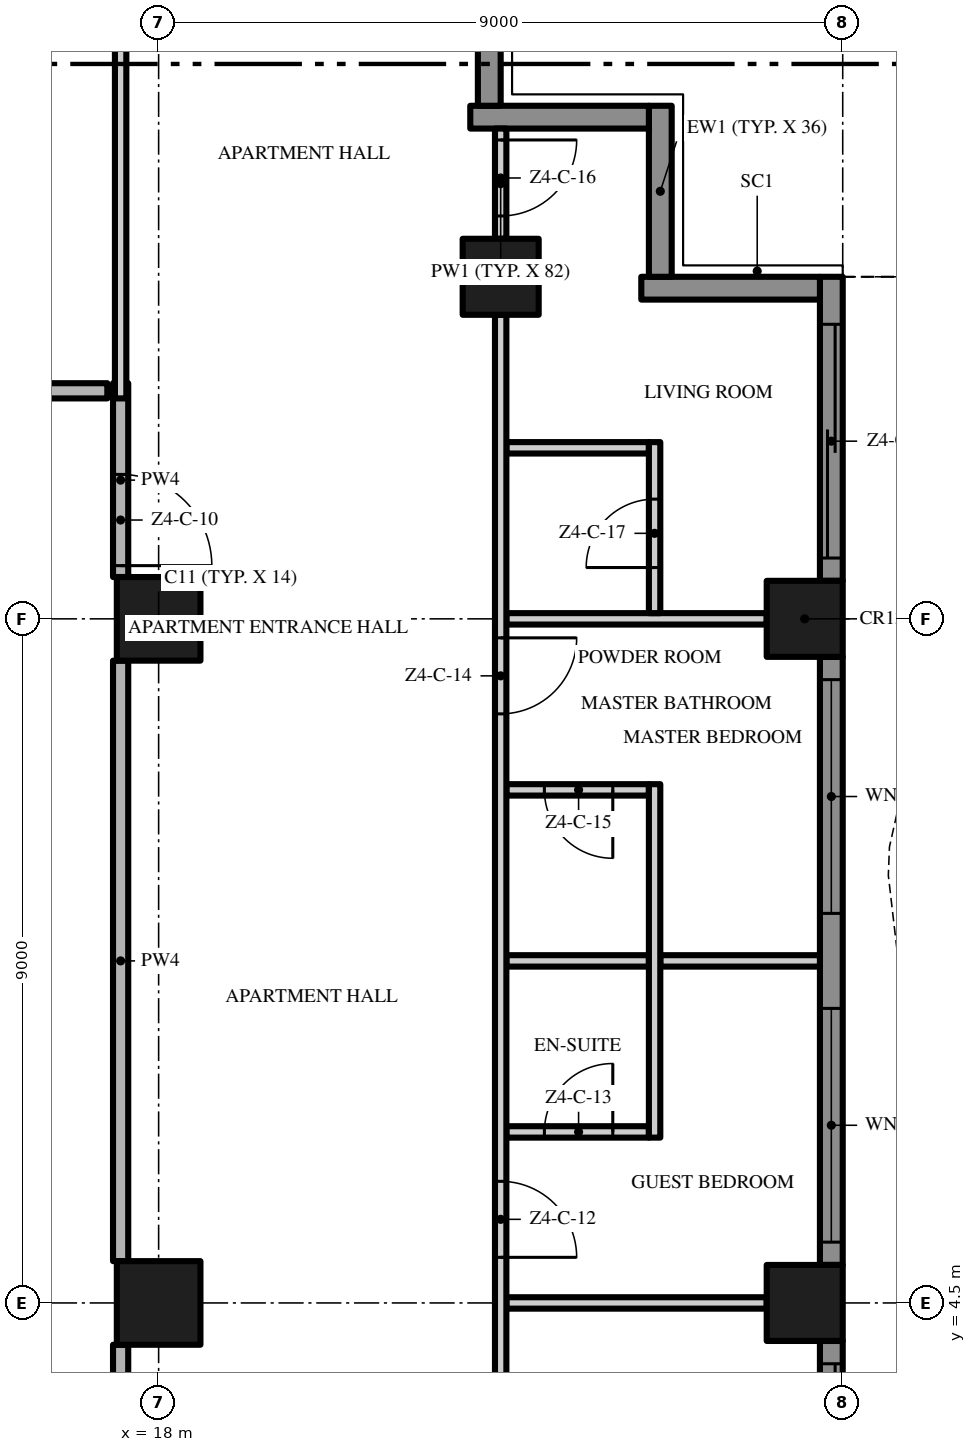
"""IFC4 building model, lengths in metres.
Left out: names, types, materials, properties, quantities, classifications, styles, units other than length and angle.
Written with IfcOpenShell. Run it as: python <this file> out.ifc"""

import sys

from ifc_helpers import new_model, si_unit, direction, frame, frame_2d, origin, origin_2d, place, context, subcontext, project, spatial, polyline, rectangle, outline, extrude, element, fill, save


model = new_model("IFC4")
c1 = context("Model", 3, precision=1e-05, world=origin(), true_north=direction((0.0, 1.0)))
c2 = subcontext(c1, "Body", "Model", "MODEL_VIEW")
j1 = project(units=[si_unit("LENGTHUNIT", "METRE"), si_unit("PLANEANGLEUNIT", "RADIAN")], contexts=[c1])
p1 = place(None, origin())
s1 = spatial("IfcSite", under=j1, at=p1, CompositionType="ELEMENT")
p2 = place(p1, origin())
s2 = spatial("IfcBuilding", under=s1, at=p2, CompositionType="ELEMENT")
p3 = place(p2, frame((0.0, 0.0, 207.2)))
s3 = spatial("IfcBuildingStorey", under=s2, at=p3, CompositionType="ELEMENT", Elevation=207.2)
for number, where, z_axis, x_axis in (
    (1, (18.0, 13.5, 0.0), (0.0, 0.0, 1.0), (1.0, 0.0, 0.0)),
    (2, (18.0, 4.5, 0.0), (0.0, 0.0, 1.0), (1.0, 0.0, 0.0)),
):
    element("IfcColumn", number, at=place(p3, frame(where, z_axis=z_axis, x_axis=x_axis)), inside=s3, PredefinedType="COLUMN", context=c2, shape_type="SweptSolid", body=[
        extrude(rectangle(XDim=1.1, YDim=1.1, at=origin_2d()), origin(), (0.0, 0.0, 1.0), 3.5),
    ])
for number, where, z_axis, x_axis in (
    (3, (26.5, 13.5, 0.0), (0.0, 0.0, 1.0), (1.0, 0.0, 0.0)),
    (4, (22.5, 18.0, 0.0), (0.0, 0.0, 1.0), (1.0, 0.0, 0.0)),
    (5, (26.5, 4.5, 0.0), (0.0, 0.0, 1.0), (1.0, 0.0, 0.0)),
):
    element("IfcColumn", number, at=place(p3, frame(where, z_axis=z_axis, x_axis=x_axis)), inside=s3, PredefinedType="COLUMN", context=c2, shape_type="SweptSolid", body=[
        extrude(rectangle(XDim=1.0, YDim=1.0, at=origin_2d()), origin(), (0.0, 0.0, 1.0), 3.5),
    ])
p4 = place(p3, frame((26.85, 4.0, 0.0), z_axis=(0.0, 0.0, 1.0), x_axis=(0.0, -1.0, 0.0)))
e6 = element("IfcWall", 6, at=p4, inside=s3, PredefinedType="SOLIDWALL", context=c2, shape_type="SweptSolid", body=[
    extrude(rectangle(XDim=8.0, YDim=0.3, at=frame_2d((4.0, 0.0))), origin(), (0.0, 0.0, 1.0), 3.5),
])
p5 = place(p4, frame((4.625, 0.0, 0.45)))
e7 = element("IfcOpeningElement", 7, at=p5, cuts=e6, PredefinedType="OPENING", context=c2, shape_type="SweptSolid", body=[
    extrude(rectangle(XDim=3.075, YDim=2.65, at=frame_2d((1.538, 1.325))), frame((0.0, 0.16, 0.0), z_axis=(0.0, -1.0, 0.0), x_axis=(1.0, 0.0, 0.0)), (0.0, 0.0, 1.0), 0.32),
])
p6 = place(p4, frame((0.3, 0.0, 0.0)))
e8 = element("IfcOpeningElement", 8, at=p6, cuts=e6, PredefinedType="OPENING", context=c2, shape_type="SweptSolid", body=[
    extrude(rectangle(XDim=3.075, YDim=2.4, at=frame_2d((1.538, 1.2))), frame((0.0, 0.16, 0.0), z_axis=(0.0, -1.0, 0.0), x_axis=(1.0, 0.0, 0.0)), (0.0, 0.0, 1.0), 0.32),
])
p7 = place(p3, frame((26.85, 13.0, 0.0), z_axis=(0.0, 0.0, 1.0), x_axis=(0.0, -1.0, 0.0)))
e9 = element("IfcWall", 9, at=p7, inside=s3, PredefinedType="SOLIDWALL", context=c2, shape_type="SweptSolid", body=[
    extrude(rectangle(XDim=8.0, YDim=0.3, at=frame_2d((4.0, 0.0))), origin(), (0.0, 0.0, 1.0), 3.5),
])
p8 = place(p7, frame((4.625, 0.0, 0.45)))
e10 = element("IfcOpeningElement", 10, at=p8, cuts=e9, PredefinedType="OPENING", context=c2, shape_type="SweptSolid", body=[
    extrude(rectangle(XDim=3.075, YDim=2.65, at=frame_2d((1.538, 1.325))), frame((0.0, 0.16, 0.0), z_axis=(0.0, -1.0, 0.0), x_axis=(1.0, 0.0, 0.0)), (0.0, 0.0, 1.0), 0.32),
])
p9 = place(p7, frame((0.3, 0.0, 0.45)))
e11 = element("IfcOpeningElement", 11, at=p9, cuts=e9, PredefinedType="OPENING", context=c2, shape_type="SweptSolid", body=[
    extrude(rectangle(XDim=3.075, YDim=2.65, at=frame_2d((1.538, 1.325))), frame((0.0, 0.16, 0.0), z_axis=(0.0, -1.0, 0.0), x_axis=(1.0, 0.0, 0.0)), (0.0, 0.0, 1.0), 0.32),
])
p10 = place(p3, frame((26.85, 18.0, 0.0), z_axis=(0.0, 0.0, 1.0), x_axis=(0.0, -1.0, 0.0)))
e12 = element("IfcWall", 12, at=p10, inside=s3, PredefinedType="SOLIDWALL", context=c2, shape_type="SweptSolid", body=[
    extrude(rectangle(XDim=4.0, YDim=0.3, at=frame_2d((2.0, 0.0))), origin(), (0.0, 0.0, 1.0), 3.5),
])
p11 = place(p10, frame((0.625, 0.0, 0.0)))
e13 = element("IfcOpeningElement", 13, at=p11, cuts=e12, PredefinedType="OPENING", context=c2, shape_type="SweptSolid", body=[
    extrude(rectangle(XDim=3.075, YDim=2.4, at=frame_2d((1.538, 1.2))), frame((0.0, 0.16, 0.0), z_axis=(0.0, -1.0, 0.0), x_axis=(1.0, 0.0, 0.0)), (0.0, 0.0, 1.0), 0.32),
])
p12 = place(p3, frame((24.35, 17.85, 0.0), z_axis=(0.0, 0.0, 1.0), x_axis=(1.0, 0.0, 0.0)))
e14 = element("IfcWall", 14, at=p12, inside=s3, PredefinedType="SOLIDWALL", context=c2, shape_type="SweptSolid", body=[
    extrude(rectangle(XDim=2.35, YDim=0.3, at=frame_2d((1.175, 0.0))), origin(), (0.0, 0.0, 1.0), 3.5),
])
p13 = place(p3, frame((24.6, 20.25, 0.0), z_axis=(0.0, 0.0, 1.0), x_axis=(0.0, -1.0, 0.0)))
e15 = element("IfcWall", 15, at=p13, inside=s3, PredefinedType="SOLIDWALL", context=c2, shape_type="SweptSolid", body=[
    extrude(rectangle(XDim=2.25, YDim=0.3, at=frame_2d((1.125, 0.0))), origin(), (0.0, 0.0, 1.0), 3.5),
])
p14 = place(p3, frame((22.1, 20.1, 0.0), z_axis=(0.0, 0.0, 1.0), x_axis=(1.0, 0.0, 0.0)))
e16 = element("IfcWall", 16, at=p14, inside=s3, PredefinedType="SOLIDWALL", context=c2, shape_type="SweptSolid", body=[
    extrude(rectangle(XDim=2.35, YDim=0.3, at=frame_2d((1.175, 0.0))), origin(), (0.0, 0.0, 1.0), 3.5),
])
p15 = place(p3, frame((22.35, 22.5, 0.0), z_axis=(0.0, 0.0, 1.0), x_axis=(0.0, -1.0, 0.0)))
e17 = element("IfcWall", 17, at=p15, inside=s3, PredefinedType="SOLIDWALL", context=c2, shape_type="SweptSolid", body=[
    extrude(rectangle(XDim=2.25, YDim=0.3, at=frame_2d((1.125, 0.0))), origin(), (0.0, 0.0, 1.0), 3.5),
])
p16 = place(p3, origin())
e18 = element("IfcWall", 18, at=p16, inside=s3, PredefinedType="USERDEFINED", context=c2, shape_type="SweptSolid", body=[
    extrude(outline(polyline([(27.951, -18.0), (28.612, -16.5), (29.345, -15.0), (29.869, -13.5), (30.0, -12.375), (29.985, -12.0), (29.649, -10.5), (28.988, -9.0), (28.255, -7.5), (27.731, -6.0), (27.6, -4.875), (27.615, -4.5), (27.951, -3.0), (28.612, -1.5), (29.345, 0.0), (29.869, 1.5), (30.0, 2.625), (29.985, 3.0), (29.649, 4.5), (28.988, 6.0), (28.255, 7.5), (27.731, 9.0), (27.6, 10.125), (27.615, 10.5), (27.951, 12.0), (28.612, 13.5), (29.345, 15.0), (29.869, 16.5), (30.0, 17.625), (29.985, 18.0), (29.735, 17.99), (29.749, 17.635), (29.624, 16.556), (29.114, 15.096), (28.385, 13.605), (27.713, 12.079), (27.366, 10.533), (27.349, 10.115), (27.486, 8.944), (28.024, 7.404), (28.761, 5.895), (29.41, 4.421), (29.736, 2.967), (29.749, 2.635), (29.624, 1.556), (29.114, 0.096), (28.385, -1.395), (27.713, -2.921), (27.366, -4.467), (27.349, -4.885), (27.486, -6.056), (28.024, -7.596), (28.761, -9.105), (29.41, -10.579), (29.736, -12.033), (29.749, -12.365), (29.624, -13.444), (29.114, -14.904), (28.385, -16.395), (27.723, -17.899), (27.951, -18.0)])), origin(), (0.0, 0.0, 1.0), 0.9),
])
p17 = place(p3, frame((22.575, 4.5, 0.0), z_axis=(0.0, 0.0, 1.0), x_axis=(1.0, 0.0, 0.0)))
e19 = element("IfcWall", 19, at=p17, inside=s3, PredefinedType="PARTITIONING", context=c2, shape_type="SweptSolid", body=[
    extrude(rectangle(XDim=3.425, YDim=0.15, at=frame_2d((1.712, 0.0))), origin(), (0.0, 0.0, 1.0), 3.5),
])
p18 = place(p3, frame((22.575, 6.75, 0.0), z_axis=(0.0, 0.0, 1.0), x_axis=(1.0, 0.0, 0.0)))
e20 = element("IfcWall", 20, at=p18, inside=s3, PredefinedType="PARTITIONING", context=c2, shape_type="SweptSolid", body=[
    extrude(rectangle(XDim=1.875, YDim=0.15, at=frame_2d((0.938, 0.0))), origin(), (0.0, 0.0, 1.0), 3.5),
])
p19 = place(p18, frame((0.5, 0.0, 0.0)))
e21 = element("IfcOpeningElement", 21, at=p19, cuts=e20, PredefinedType="OPENING", context=c2, shape_type="SweptSolid", body=[
    extrude(rectangle(XDim=0.9, YDim=2.1, at=frame_2d((0.45, 1.05))), frame((0.0, 0.085, 0.0), z_axis=(0.0, -1.0, 0.0), x_axis=(1.0, 0.0, 0.0)), (0.0, 0.0, 1.0), 0.17),
])
p20 = place(p3, frame((22.575, 9.0, 0.0), z_axis=(0.0, 0.0, 1.0), x_axis=(1.0, 0.0, 0.0)))
e22 = element("IfcWall", 22, at=p20, inside=s3, PredefinedType="PARTITIONING", context=c2, shape_type="SweptSolid", body=[
    extrude(rectangle(XDim=1.875, YDim=0.15, at=frame_2d((0.938, 0.0))), origin(), (0.0, 0.0, 1.0), 3.5),
])
p21 = place(p3, frame((24.6, 9.0, 0.0), z_axis=(0.0, 0.0, 1.0), x_axis=(1.0, 0.0, 0.0)))
e23 = element("IfcWall", 23, at=p21, inside=s3, PredefinedType="PARTITIONING", context=c2, shape_type="SweptSolid", body=[
    extrude(rectangle(XDim=2.1, YDim=0.15, at=frame_2d((1.05, 0.0))), origin(), (0.0, 0.0, 1.0), 3.5),
])
p22 = place(p3, frame((24.45, 11.25, 0.0), z_axis=(0.0, 0.0, 1.0), x_axis=(-1.0, 0.0, 0.0)))
e24 = element("IfcWall", 24, at=p22, inside=s3, PredefinedType="PARTITIONING", context=c2, shape_type="SweptSolid", body=[
    extrude(rectangle(XDim=1.875, YDim=0.15, at=frame_2d((0.938, 0.0))), origin(), (0.0, 0.0, 1.0), 3.5),
])
p23 = place(p22, frame((0.475, 0.0, 0.0)))
e25 = element("IfcOpeningElement", 25, at=p23, cuts=e24, PredefinedType="OPENING", context=c2, shape_type="SweptSolid", body=[
    extrude(rectangle(XDim=0.9, YDim=2.1, at=frame_2d((0.45, 1.05))), frame((0.0, 0.085, 0.0), z_axis=(0.0, -1.0, 0.0), x_axis=(1.0, 0.0, 0.0)), (0.0, 0.0, 1.0), 0.17),
])
p24 = place(p3, frame((22.575, 13.5, 0.0), z_axis=(0.0, 0.0, 1.0), x_axis=(1.0, 0.0, 0.0)))
e26 = element("IfcWall", 26, at=p24, inside=s3, PredefinedType="PARTITIONING", context=c2, shape_type="SweptSolid", body=[
    extrude(rectangle(XDim=3.425, YDim=0.15, at=frame_2d((1.712, 0.0))), origin(), (0.0, 0.0, 1.0), 3.5),
])
p25 = place(p3, frame((22.575, 15.75, 0.0), z_axis=(0.0, 0.0, 1.0), x_axis=(1.0, 0.0, 0.0)))
e27 = element("IfcWall", 27, at=p25, inside=s3, PredefinedType="PARTITIONING", context=c2, shape_type="SweptSolid", body=[
    extrude(rectangle(XDim=1.875, YDim=0.15, at=frame_2d((0.938, 0.0))), origin(), (0.0, 0.0, 1.0), 3.5),
])
p26 = place(p3, frame((13.5, 16.5, 0.0), z_axis=(0.0, 0.0, 1.0), x_axis=(1.0, 0.0, 0.0)))
e28 = element("IfcWall", 28, at=p26, inside=s3, PredefinedType="PARTITIONING", context=c2, shape_type="SweptSolid", body=[
    extrude(rectangle(XDim=3.825, YDim=0.2, at=frame_2d((1.913, 0.0))), origin(), (0.0, 0.0, 1.0), 3.5),
])
p27 = place(p26, frame((1.55, 0.0, 0.0)))
e29 = element("IfcOpeningElement", 29, at=p27, cuts=e28, PredefinedType="OPENING", context=c2, shape_type="SweptSolid", body=[
    extrude(rectangle(XDim=0.9, YDim=2.1, at=frame_2d((0.45, 1.05))), frame((0.0, 0.11, 0.0), z_axis=(0.0, -1.0, 0.0), x_axis=(1.0, 0.0, 0.0)), (0.0, 0.0, 1.0), 0.22),
])
p28 = place(p3, frame((17.5, -0.2, 0.0), z_axis=(0.0, 0.0, 1.0), x_axis=(0.0, 1.0, 0.0)))
e30 = element("IfcWall", 30, at=p28, inside=s3, PredefinedType="PARTITIONING", context=c2, shape_type="SweptSolid", body=[
    extrude(rectangle(XDim=4.15, YDim=0.2, at=frame_2d((2.075, 0.0))), origin(), (0.0, 0.0, 1.0), 3.5),
])
p29 = place(p3, frame((17.5, 5.05, 0.0), z_axis=(0.0, 0.0, 1.0), x_axis=(0.0, 1.0, 0.0)))
e31 = element("IfcWall", 31, at=p29, inside=s3, PredefinedType="PARTITIONING", context=c2, shape_type="SweptSolid", body=[
    extrude(rectangle(XDim=7.9, YDim=0.2, at=frame_2d((3.95, 0.0))), origin(), (0.0, 0.0, 1.0), 3.5),
])
p30 = place(p3, frame((17.5, 16.6, 0.0), z_axis=(0.0, 0.0, 1.0), x_axis=(0.0, -1.0, 0.0)))
e32 = element("IfcWall", 32, at=p30, inside=s3, PredefinedType="PARTITIONING", context=c2, shape_type="SweptSolid", body=[
    extrude(rectangle(XDim=2.55, YDim=0.2, at=frame_2d((1.275, 0.0))), origin(), (0.0, 0.0, 1.0), 3.5),
])
p31 = place(p30, frame((1.2, 0.0, 0.0)))
e33 = element("IfcOpeningElement", 33, at=p31, cuts=e32, PredefinedType="OPENING", context=c2, shape_type="SweptSolid", body=[
    extrude(rectangle(XDim=1.2, YDim=2.4, at=frame_2d((0.6, 1.2))), frame((0.0, 0.11, 0.0), z_axis=(0.0, -1.0, 0.0), x_axis=(1.0, 0.0, 0.0)), (0.0, 0.0, 1.0), 0.22),
])
p32 = place(p3, frame((17.5, 16.4, 0.0), z_axis=(0.0, 0.0, 1.0), x_axis=(0.0, 1.0, 0.0)))
e34 = element("IfcWall", 34, at=p32, inside=s3, PredefinedType="PARTITIONING", context=c2, shape_type="SweptSolid", body=[
    extrude(rectangle(XDim=5.1, YDim=0.15, at=frame_2d((2.55, 0.0))), origin(), (0.0, 0.0, 1.0), 3.5),
])
p33 = place(p3, frame((22.5, 17.5, 0.0), z_axis=(0.0, 0.0, 1.0), x_axis=(0.0, -1.0, 0.0)))
e35 = element("IfcWall", 35, at=p33, inside=s3, PredefinedType="PARTITIONING", context=c2, shape_type="SweptSolid", body=[
    extrude(rectangle(XDim=17.4, YDim=0.15, at=frame_2d((8.7, 0.0))), origin(), (0.0, 0.0, 1.0), 3.5),
])
p34 = place(p33, frame((14.75, 0.0, 0.0)))
e36 = element("IfcOpeningElement", 36, at=p34, cuts=e35, PredefinedType="OPENING", context=c2, shape_type="SweptSolid", body=[
    extrude(rectangle(XDim=1.0, YDim=2.4, at=frame_2d((0.5, 1.2))), frame((0.0, 0.085, 0.0), z_axis=(0.0, -1.0, 0.0), x_axis=(1.0, 0.0, 0.0)), (0.0, 0.0, 1.0), 0.17),
])
p35 = place(p33, frame((11.4, 0.0, 0.0)))
e37 = element("IfcOpeningElement", 37, at=p35, cuts=e35, PredefinedType="OPENING", context=c2, shape_type="SweptSolid", body=[
    extrude(rectangle(XDim=1.0, YDim=2.4, at=frame_2d((0.5, 1.2))), frame((0.0, 0.085, 0.0), z_axis=(0.0, -1.0, 0.0), x_axis=(1.0, 0.0, 0.0)), (0.0, 0.0, 1.0), 0.17),
])
p36 = place(p33, frame((4.25, 0.0, 0.0)))
e38 = element("IfcOpeningElement", 38, at=p36, cuts=e35, PredefinedType="OPENING", context=c2, shape_type="SweptSolid", body=[
    extrude(rectangle(XDim=1.0, YDim=2.4, at=frame_2d((0.5, 1.2))), frame((0.0, 0.085, 0.0), z_axis=(0.0, -1.0, 0.0), x_axis=(1.0, 0.0, 0.0)), (0.0, 0.0, 1.0), 0.17),
])
p37 = place(p3, frame((22.5, 19.95, 0.0), z_axis=(0.0, 0.0, 1.0), x_axis=(0.0, -1.0, 0.0)))
e39 = element("IfcWall", 39, at=p37, inside=s3, PredefinedType="PARTITIONING", context=c2, shape_type="SweptSolid", body=[
    extrude(rectangle(XDim=1.45, YDim=0.15, at=frame_2d((0.725, 0.0))), origin(), (0.0, 0.0, 1.0), 3.5),
])
p38 = place(p37, frame((0.15, 0.0, 0.0)))
e40 = element("IfcOpeningElement", 40, at=p38, cuts=e39, PredefinedType="OPENING", context=c2, shape_type="SweptSolid", body=[
    extrude(rectangle(XDim=1.0, YDim=2.4, at=frame_2d((0.5, 1.2))), frame((0.0, 0.085, 0.0), z_axis=(0.0, -1.0, 0.0), x_axis=(1.0, 0.0, 0.0)), (0.0, 0.0, 1.0), 0.17),
])
p39 = place(p3, frame((24.525, 6.675, 0.0), z_axis=(0.0, 0.0, 1.0), x_axis=(0.0, 1.0, 0.0)))
e41 = element("IfcWall", 41, at=p39, inside=s3, PredefinedType="PARTITIONING", context=c2, shape_type="SweptSolid", body=[
    extrude(rectangle(XDim=4.65, YDim=0.15, at=frame_2d((2.325, 0.0))), origin(), (0.0, 0.0, 1.0), 3.5),
])
p40 = place(p3, frame((24.525, 13.575, 0.0), z_axis=(0.0, 0.0, 1.0), x_axis=(0.0, 1.0, 0.0)))
e42 = element("IfcWall", 42, at=p40, inside=s3, PredefinedType="PARTITIONING", context=c2, shape_type="SweptSolid", body=[
    extrude(rectangle(XDim=2.25, YDim=0.15, at=frame_2d((1.125, 0.0))), origin(), (0.0, 0.0, 1.0), 3.5),
])
p41 = place(p40, frame((0.6, 0.0, 0.0)))
e43 = element("IfcOpeningElement", 43, at=p41, cuts=e42, PredefinedType="OPENING", context=c2, shape_type="SweptSolid", body=[
    extrude(rectangle(XDim=0.9, YDim=2.1, at=frame_2d((0.45, 1.05))), frame((0.0, 0.085, 0.0), z_axis=(0.0, -1.0, 0.0), x_axis=(1.0, 0.0, 0.0)), (0.0, 0.0, 1.0), 0.17),
])
p42 = place(p6, origin())
e44 = element("IfcDoor", 44, at=p42, inside=s3, OperationType="SINGLE_SWING_LEFT", PredefinedType="DOOR", context=c2, shape_type="SweptSolid", body=[
    extrude(rectangle(XDim=3.075, YDim=2.4, at=frame_2d((1.538, 1.2))), frame((0.0, 0.025, 0.0), z_axis=(0.0, -1.0, 0.0), x_axis=(1.0, 0.0, 0.0)), (0.0, 0.0, 1.0), 0.05),
])
fill(e8, e44)
p43 = place(p8, origin())
e45 = element("IfcWindow", 45, at=p43, inside=s3, PartitioningType="SINGLE_PANEL", PredefinedType="WINDOW", context=c2, shape_type="SweptSolid", body=[
    extrude(rectangle(XDim=3.075, YDim=2.65, at=frame_2d((1.538, 1.325))), frame((0.0, 0.03, 0.0), z_axis=(0.0, -1.0, 0.0), x_axis=(1.0, 0.0, 0.0)), (0.0, 0.0, 1.0), 0.06),
])
fill(e10, e45)
p44 = place(p9, origin())
e46 = element("IfcWindow", 46, at=p44, inside=s3, PartitioningType="SINGLE_PANEL", PredefinedType="WINDOW", context=c2, shape_type="SweptSolid", body=[
    extrude(rectangle(XDim=3.075, YDim=2.65, at=frame_2d((1.538, 1.325))), frame((0.0, 0.03, 0.0), z_axis=(0.0, -1.0, 0.0), x_axis=(1.0, 0.0, 0.0)), (0.0, 0.0, 1.0), 0.06),
])
fill(e11, e46)
p45 = place(p11, origin())
e47 = element("IfcDoor", 47, at=p45, inside=s3, OperationType="SINGLE_SWING_LEFT", PredefinedType="DOOR", context=c2, shape_type="SweptSolid", body=[
    extrude(rectangle(XDim=3.075, YDim=2.4, at=frame_2d((1.538, 1.2))), frame((0.0, 0.025, 0.0), z_axis=(0.0, -1.0, 0.0), x_axis=(1.0, 0.0, 0.0)), (0.0, 0.0, 1.0), 0.05),
])
fill(e13, e47)
p46 = place(p31, origin())
e48 = element("IfcDoor", 48, at=p46, inside=s3, OperationType="SINGLE_SWING_RIGHT", PredefinedType="DOOR", context=c2, shape_type="SweptSolid", body=[
    extrude(rectangle(XDim=1.2, YDim=2.4, at=frame_2d((0.6, 1.2))), frame((0.0, 0.025, 0.0), z_axis=(0.0, -1.0, 0.0), x_axis=(1.0, 0.0, 0.0)), (0.0, 0.0, 1.0), 0.05),
])
fill(e33, e48)
p47 = place(p35, origin())
e49 = element("IfcDoor", 49, at=p47, inside=s3, OperationType="SINGLE_SWING_RIGHT", PredefinedType="DOOR", context=c2, shape_type="SweptSolid", body=[
    extrude(rectangle(XDim=1.0, YDim=2.4, at=frame_2d((0.5, 1.2))), frame((0.0, 0.025, 0.0), z_axis=(0.0, -1.0, 0.0), x_axis=(1.0, 0.0, 0.0)), (0.0, 0.0, 1.0), 0.05),
])
fill(e37, e49)
p48 = place(p19, origin())
e50 = element("IfcDoor", 50, at=p48, inside=s3, OperationType="SINGLE_SWING_RIGHT", PredefinedType="DOOR", context=c2, shape_type="SweptSolid", body=[
    extrude(rectangle(XDim=0.9, YDim=2.1, at=frame_2d((0.45, 1.05))), frame((0.0, 0.025, 0.0), z_axis=(0.0, -1.0, 0.0), x_axis=(1.0, 0.0, 0.0)), (0.0, 0.0, 1.0), 0.05),
])
fill(e21, e50)
p49 = place(p36, origin())
e51 = element("IfcDoor", 51, at=p49, inside=s3, OperationType="SINGLE_SWING_LEFT", PredefinedType="DOOR", context=c2, shape_type="SweptSolid", body=[
    extrude(rectangle(XDim=1.0, YDim=2.4, at=frame_2d((0.5, 1.2))), frame((0.0, 0.025, 0.0), z_axis=(0.0, -1.0, 0.0), x_axis=(1.0, 0.0, 0.0)), (0.0, 0.0, 1.0), 0.05),
])
fill(e38, e51)
p50 = place(p23, origin())
e52 = element("IfcDoor", 52, at=p50, inside=s3, OperationType="SINGLE_SWING_LEFT", PredefinedType="DOOR", context=c2, shape_type="SweptSolid", body=[
    extrude(rectangle(XDim=0.9, YDim=2.1, at=frame_2d((0.45, 1.05))), frame((0.0, 0.025, 0.0), z_axis=(0.0, -1.0, 0.0), x_axis=(1.0, 0.0, 0.0)), (0.0, 0.0, 1.0), 0.05),
])
fill(e25, e52)
p51 = place(p38, origin())
e53 = element("IfcDoor", 53, at=p51, inside=s3, OperationType="SINGLE_SWING_LEFT", PredefinedType="DOOR", context=c2, shape_type="SweptSolid", body=[
    extrude(rectangle(XDim=1.0, YDim=2.4, at=frame_2d((0.5, 1.2))), frame((0.0, 0.025, 0.0), z_axis=(0.0, -1.0, 0.0), x_axis=(1.0, 0.0, 0.0)), (0.0, 0.0, 1.0), 0.05),
])
fill(e40, e53)
p52 = place(p41, origin())
e54 = element("IfcDoor", 54, at=p52, inside=s3, OperationType="SINGLE_SWING_LEFT", PredefinedType="DOOR", context=c2, shape_type="SweptSolid", body=[
    extrude(rectangle(XDim=0.9, YDim=2.1, at=frame_2d((0.45, 1.05))), frame((0.0, 0.025, 0.0), z_axis=(0.0, -1.0, 0.0), x_axis=(1.0, 0.0, 0.0)), (0.0, 0.0, 1.0), 0.05),
])
fill(e43, e54)
save(model, sys.argv[1])
